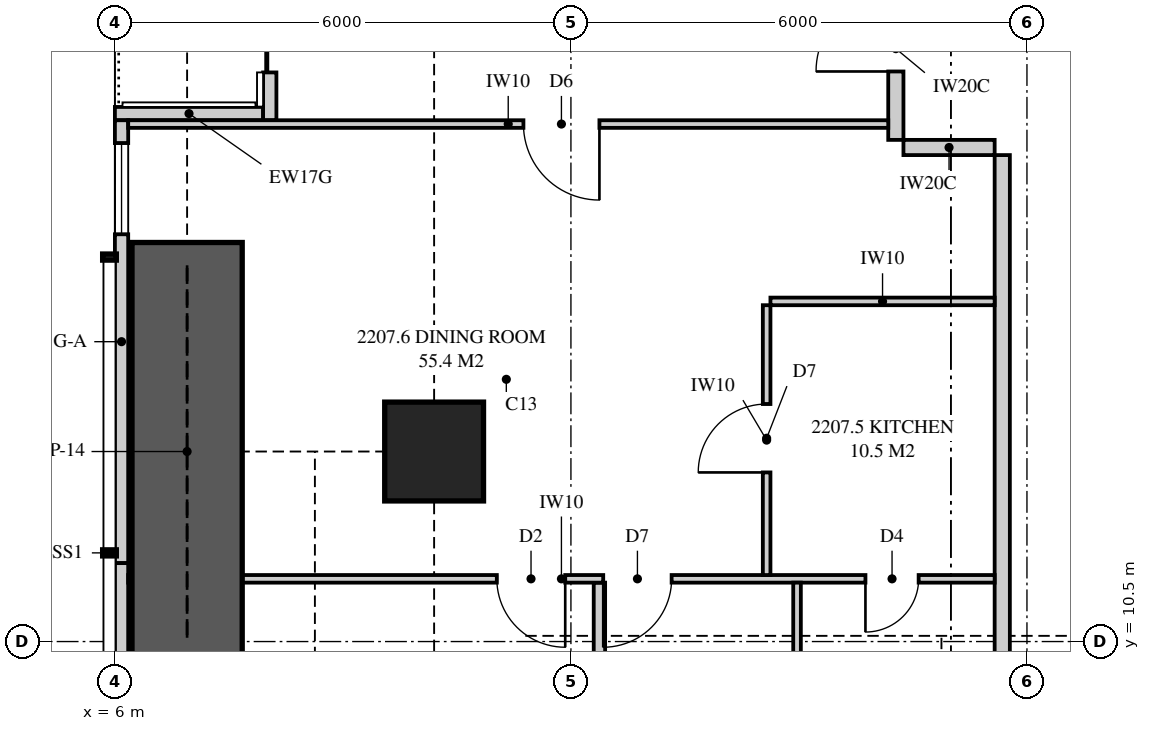
"""IFC4 building model, lengths in metres.
Left out: names, types, materials, properties, quantities, classifications, styles, units other than length and angle.
Written with IfcOpenShell. Run it as: python <this file> out.ifc"""

import sys

from ifc_helpers import new_model, si_unit, direction, frame, frame_2d, origin, origin_2d, place, context, subcontext, project, spatial, polyline, rectangle, outline, extrude, element, fill, save


model = new_model("IFC4")
c1 = context("Model", 3, precision=1e-05, world=origin(), true_north=direction((0.0, 1.0)))
c2 = subcontext(c1, "Body", "Model", "MODEL_VIEW")
j1 = project(units=[si_unit("LENGTHUNIT", "METRE"), si_unit("PLANEANGLEUNIT", "RADIAN")], contexts=[c1])
p1 = place(None, origin())
s1 = spatial("IfcSite", under=j1, at=p1, CompositionType="ELEMENT")
p2 = place(p1, origin())
s2 = spatial("IfcBuilding", under=s1, at=p2, CompositionType="ELEMENT")
p3 = place(p2, frame((0.0, 0.0, 84.75)))
s3 = spatial("IfcBuildingStorey", under=s2, at=p3, CompositionType="ELEMENT", Elevation=84.75)
p4 = place(p3, frame((10.2, 13.0, 0.0), z_axis=(0.0, 0.0, 1.0), x_axis=(1.0, 0.0, 0.0)))
e1 = element("IfcColumn", 1, at=p4, inside=s3, PredefinedType="COLUMN", context=c2, shape_type="SweptSolid", body=[
    extrude(rectangle(XDim=1.3, YDim=1.3, at=origin_2d()), origin(), (0.0, 0.0, 1.0), 3.35),
])
p5 = place(p3, frame((6.087, 17.358, 0.0), z_axis=(0.0, 0.0, 1.0), x_axis=(0.0, -1.0, 0.0)))
e2 = element("IfcWall", 2, at=p5, inside=s3, PredefinedType="SOLIDWALL", context=c2, shape_type="SweptSolid", body=[
    extrude(outline(polyline([(5.118, 0.092), (5.118, 0.0), (5.826, 0.0), (5.826, 2.15), (0.0, 2.15), (0.0, 0.0), (3.598, 0.0), (3.598, 0.092), (5.118, 0.092)])), frame((0.0, 0.087, 0.0), z_axis=(0.0, -1.0, 0.0), x_axis=(1.0, 0.0, 0.0)), (0.0, 0.0, 1.0), 0.175),
])
p6 = place(p5, frame((0.3, 0.0, 0.4)))
e3 = element("IfcOpeningElement", 3, at=p6, cuts=e2, PredefinedType="OPENING", context=c2, shape_type="SweptSolid", body=[
    extrude(rectangle(XDim=1.2, YDim=1.7, at=frame_2d((0.6, 0.85))), frame((0.0, 0.097, 0.0), z_axis=(0.0, -1.0, 0.0), x_axis=(1.0, 0.0, 0.0)), (0.0, 0.0, 1.0), 0.195),
])
p7 = place(p3, frame((6.087, 11.532, 0.0), z_axis=(0.0, 0.0, 1.0), x_axis=(0.0, -1.0, 0.0)))
e4 = element("IfcWall", 4, at=p7, inside=s3, PredefinedType="SOLIDWALL", context=c2, shape_type="SweptSolid", body=[
    extrude(rectangle(XDim=8.481, YDim=0.175, at=frame_2d((4.24, 0.0))), origin(), (0.0, 0.0, 1.0), 3.11),
])
p8 = place(p7, frame((1.407, 0.0, 0.4)))
e5 = element("IfcOpeningElement", 5, at=p8, cuts=e4, PredefinedType="OPENING", context=c2, shape_type="SweptSolid", body=[
    extrude(rectangle(XDim=1.8, YDim=1.7, at=frame_2d((0.9, 0.85))), frame((0.0, 0.097, 0.0), z_axis=(0.0, -1.0, 0.0), x_axis=(1.0, 0.0, 0.0)), (0.0, 0.0, 1.0), 0.195),
])
p9 = place(p7, frame((4.439, 0.0, 0.4)))
e6 = element("IfcOpeningElement", 6, at=p9, cuts=e4, PredefinedType="OPENING", context=c2, shape_type="SweptSolid", body=[
    extrude(rectangle(XDim=1.8, YDim=1.7, at=frame_2d((0.9, 0.85))), frame((0.0, 0.097, 0.0), z_axis=(0.0, -1.0, 0.0), x_axis=(1.0, 0.0, 0.0)), (0.0, 0.0, 1.0), 0.195),
])
p10 = place(p3, frame((8.038, 20.417, 0.0), z_axis=(0.0, 0.0, 1.0), x_axis=(0.0, -1.0, 0.0)))
e7 = element("IfcWall", 7, at=p10, inside=s3, PredefinedType="SOLIDWALL", context=c2, shape_type="SweptSolid", body=[
    extrude(rectangle(XDim=3.058, YDim=0.175, at=frame_2d((1.529, 0.0))), origin(), (0.0, 0.0, 1.0), 2.15),
])
p11 = place(p10, frame((0.629, 0.0, 0.0)))
e8 = element("IfcOpeningElement", 8, at=p11, cuts=e7, PredefinedType="OPENING", context=c2, shape_type="SweptSolid", body=[
    extrude(rectangle(XDim=1.8, YDim=2.1, at=frame_2d((0.9, 1.05))), frame((0.0, 0.097, 0.0), z_axis=(0.0, -1.0, 0.0), x_axis=(1.0, 0.0, 0.0)), (0.0, 0.0, 1.0), 0.195),
])
p12 = place(p3, frame((6.0, 17.446, 0.0), z_axis=(0.0, 0.0, 1.0), x_axis=(1.0, 0.0, 0.0)))
e9 = element("IfcWall", 9, at=p12, inside=s3, PredefinedType="SOLIDWALL", context=c2, shape_type="SweptSolid", body=[
    extrude(rectangle(XDim=1.95, YDim=0.175, at=frame_2d((0.975, 0.0))), origin(), (0.0, 0.0, 1.0), 2.15),
])
p13 = place(p3, frame((17.675, 7.825, 0.0), z_axis=(0.0, 0.0, 1.0), x_axis=(0.0, 1.0, 0.0)))
e10 = element("IfcWall", 10, at=p13, inside=s3, PredefinedType="PARTITIONING", context=c2, shape_type="SweptSolid", body=[
    extrude(outline(polyline([(0.0, 0.0), (9.075, 0.0), (9.075, 3.11), (3.096, 3.11), (3.096, 2.531), (2.404, 2.531), (2.404, 3.11), (0.0, 3.11), (0.0, 0.0)])), frame((0.0, 0.1, 0.0), z_axis=(0.0, -1.0, 0.0), x_axis=(1.0, 0.0, 0.0)), (0.0, 0.0, 1.0), 0.2),
])
p14 = place(p3, frame((6.175, 11.325, 0.0), z_axis=(0.0, 0.0, 1.0), x_axis=(1.0, 0.0, 0.0)))
e11 = element("IfcWall", 11, at=p14, inside=s3, PredefinedType="PARTITIONING", context=c2, shape_type="SweptSolid", body=[
    extrude(outline(polyline([(0.0, 0.0), (11.4, 0.0), (11.4, 3.11), (5.285, 3.11), (5.285, 2.51), (2.765, 2.51), (2.765, 3.11), (2.753, 3.11), (2.753, 2.531), (2.16, 2.531), (2.16, 3.11), (2.121, 3.11), (2.121, 2.15), (1.021, 2.15), (1.021, 1.734), (0.529, 1.734), (0.529, 2.15), (0.0, 2.15), (0.0, 0.0)])), frame((0.0, 0.05, 0.0), z_axis=(0.0, -1.0, 0.0), x_axis=(1.0, 0.0, 0.0)), (0.0, 0.0, 1.0), 0.1),
])
p15 = place(p14, frame((4.85, 0.0, 0.0)))
e12 = element("IfcOpeningElement", 12, at=p15, cuts=e11, PredefinedType="OPENING", context=c2, shape_type="SweptSolid", body=[
    extrude(rectangle(XDim=0.9, YDim=2.1, at=frame_2d((0.45, 1.05))), frame((0.0, 0.06, 0.0), z_axis=(0.0, -1.0, 0.0), x_axis=(1.0, 0.0, 0.0)), (0.0, 0.0, 1.0), 0.12),
])
p16 = place(p14, frame((6.25, 0.0, 0.0)))
e13 = element("IfcOpeningElement", 13, at=p16, cuts=e11, PredefinedType="OPENING", context=c2, shape_type="SweptSolid", body=[
    extrude(rectangle(XDim=0.9, YDim=2.1, at=frame_2d((0.45, 1.05))), frame((0.0, 0.06, 0.0), z_axis=(0.0, -1.0, 0.0), x_axis=(1.0, 0.0, 0.0)), (0.0, 0.0, 1.0), 0.12),
])
p17 = place(p14, frame((9.7, 0.0, 0.0)))
e14 = element("IfcOpeningElement", 14, at=p17, cuts=e11, PredefinedType="OPENING", context=c2, shape_type="SweptSolid", body=[
    extrude(rectangle(XDim=0.7, YDim=2.1, at=frame_2d((0.35, 1.05))), frame((0.0, 0.06, 0.0), z_axis=(0.0, -1.0, 0.0), x_axis=(1.0, 0.0, 0.0)), (0.0, 0.0, 1.0), 0.12),
])
p18 = place(p3, frame((12.375, 7.825, 0.0), z_axis=(0.0, 0.0, 1.0), x_axis=(0.0, 1.0, 0.0)))
e15 = element("IfcWall", 15, at=p18, inside=s3, PredefinedType="PLUMBINGWALL", context=c2, shape_type="SweptSolid", body=[
    extrude(outline(polyline([(0.0, 0.0), (3.45, 0.0), (3.45, 3.11), (3.071, 3.11), (3.071, 2.531), (2.429, 2.531), (2.429, 3.11), (0.0, 3.11), (0.0, 0.0)])), frame((0.0, 0.075, 0.0), z_axis=(0.0, -1.0, 0.0), x_axis=(1.0, 0.0, 0.0)), (0.0, 0.0, 1.0), 0.15),
])
p19 = place(p3, frame((14.975, 7.825, 0.0), z_axis=(0.0, 0.0, 1.0), x_axis=(0.0, 1.0, 0.0)))
e16 = element("IfcWall", 16, at=p19, inside=s3, PredefinedType="PARTITIONING", context=c2, shape_type="SweptSolid", body=[
    extrude(outline(polyline([(0.0, 0.0), (3.45, 0.0), (3.45, 3.11), (3.046, 3.11), (3.046, 2.531), (2.454, 2.531), (2.454, 3.11), (0.0, 3.11), (0.0, 0.0)])), frame((0.0, 0.05, 0.0), z_axis=(0.0, -1.0, 0.0), x_axis=(1.0, 0.0, 0.0)), (0.0, 0.0, 1.0), 0.1),
])
p20 = place(p3, frame((14.575, 11.375, 0.0), z_axis=(0.0, 0.0, 1.0), x_axis=(0.0, 1.0, 0.0)))
e17 = element("IfcWall", 17, at=p20, inside=s3, PredefinedType="PARTITIONING", context=c2, shape_type="SweptSolid", body=[
    extrude(rectangle(XDim=3.55, YDim=0.1, at=frame_2d((1.775, 0.0))), origin(), (0.0, 0.0, 1.0), 3.11),
])
p21 = place(p20, frame((1.35, 0.0, 0.0)))
e18 = element("IfcOpeningElement", 18, at=p21, cuts=e17, PredefinedType="OPENING", context=c2, shape_type="SweptSolid", body=[
    extrude(rectangle(XDim=0.9, YDim=2.1, at=frame_2d((0.45, 1.05))), frame((0.0, 0.06, 0.0), z_axis=(0.0, -1.0, 0.0), x_axis=(1.0, 0.0, 0.0)), (0.0, 0.0, 1.0), 0.12),
])
p22 = place(p3, frame((14.625, 14.975, 0.0), z_axis=(0.0, 0.0, 1.0), x_axis=(1.0, 0.0, 0.0)))
e19 = element("IfcWall", 19, at=p22, inside=s3, PredefinedType="PARTITIONING", context=c2, shape_type="SweptSolid", body=[
    extrude(rectangle(XDim=2.95, YDim=0.1, at=frame_2d((1.475, 0.0))), origin(), (0.0, 0.0, 1.0), 3.11),
])
p23 = place(p3, frame((6.175, 17.308, 0.0), z_axis=(0.0, 0.0, 1.0), x_axis=(1.0, 0.0, 0.0)))
e20 = element("IfcWall", 20, at=p23, inside=s3, PredefinedType="PARTITIONING", context=c2, shape_type="SweptSolid", body=[
    extrude(outline(polyline([(0.0, 0.0), (10.0, 0.0), (10.0, 3.11), (5.285, 3.11), (5.285, 2.51), (2.765, 2.51), (2.765, 3.11), (1.835, 3.11), (1.835, 2.15), (0.0, 2.15), (0.0, 3.11), (0.0, 0.0)])), frame((0.0, 0.05, 0.0), z_axis=(0.0, -1.0, 0.0), x_axis=(1.0, 0.0, 0.0)), (0.0, 0.0, 1.0), 0.1),
])
p24 = place(p23, frame((5.2, 0.0, 0.0)))
e21 = element("IfcOpeningElement", 21, at=p24, cuts=e20, PredefinedType="OPENING", context=c2, shape_type="SweptSolid", body=[
    extrude(rectangle(XDim=1.0, YDim=2.1, at=frame_2d((0.5, 1.05))), frame((0.0, 0.06, 0.0), z_axis=(0.0, -1.0, 0.0), x_axis=(1.0, 0.0, 0.0)), (0.0, 0.0, 1.0), 0.12),
])
p25 = place(p3, frame((16.275, 17.1, 0.0), z_axis=(0.0, 0.0, 1.0), x_axis=(0.0, 1.0, 0.0)))
e22 = element("IfcWall", 22, at=p25, inside=s3, PredefinedType="PARTITIONING", context=c2, shape_type="SweptSolid", body=[
    extrude(rectangle(XDim=2.4, YDim=0.2, at=frame_2d((1.2, 0.0))), origin(), (0.0, 0.0, 1.0), 3.11),
])
p26 = place(p25, frame((0.9, 0.0, 0.0)))
e23 = element("IfcOpeningElement", 23, at=p26, cuts=e22, PredefinedType="OPENING", context=c2, shape_type="SweptSolid", body=[
    extrude(rectangle(XDim=1.05, YDim=2.2, at=frame_2d((0.525, 1.1))), frame((0.0, 0.11, 0.0), z_axis=(0.0, -1.0, 0.0), x_axis=(1.0, 0.0, 0.0)), (0.0, 0.0, 1.0), 0.22),
])
p27 = place(p3, frame((17.575, 17.0, 0.0), z_axis=(0.0, 0.0, 1.0), x_axis=(-1.0, 0.0, 0.0)))
e24 = element("IfcWall", 24, at=p27, inside=s3, PredefinedType="PARTITIONING", context=c2, shape_type="SweptSolid", body=[
    extrude(rectangle(XDim=1.2, YDim=0.2, at=frame_2d((0.6, 0.0))), origin(), (0.0, 0.0, 1.0), 3.11),
])
p28 = place(p3, frame((6.95, 10.25, 0.0), z_axis=(0.0, 0.0, 1.0), x_axis=(0.0, 1.0, 0.0)))
e25 = element("IfcWall", 25, at=p28, inside=s3, PredefinedType="SHEAR", context=c2, shape_type="SweptSolid", body=[
    extrude(rectangle(XDim=5.5, YDim=1.45, at=frame_2d((2.75, 0.0))), origin(), (0.0, 0.0, 1.0), 3.35),
])
p29 = place(p11, origin())
e26 = element("IfcDoor", 26, at=p29, inside=s3, OperationType="SLIDING_TO_LEFT", PredefinedType="DOOR", context=c2, shape_type="SweptSolid", body=[
    extrude(rectangle(XDim=1.8, YDim=2.1, at=frame_2d((0.9, 1.05))), frame((0.0, 0.025, 0.0), z_axis=(0.0, -1.0, 0.0), x_axis=(1.0, 0.0, 0.0)), (0.0, 0.0, 1.0), 0.05),
])
fill(e8, e26)
p30 = place(p6, origin())
e27 = element("IfcWindow", 27, at=p30, inside=s3, PartitioningType="SINGLE_PANEL", PredefinedType="WINDOW", context=c2, shape_type="SweptSolid", body=[
    extrude(rectangle(XDim=1.2, YDim=1.7, at=frame_2d((0.6, 0.85))), frame((0.0, 0.03, 0.0), z_axis=(0.0, -1.0, 0.0), x_axis=(1.0, 0.0, 0.0)), (0.0, 0.0, 1.0), 0.06),
])
fill(e3, e27)
p31 = place(p26, origin())
e28 = element("IfcDoor", 28, at=p31, inside=s3, OperationType="SINGLE_SWING_LEFT", PredefinedType="DOOR", context=c2, shape_type="SweptSolid", body=[
    extrude(rectangle(XDim=1.05, YDim=2.2, at=frame_2d((0.525, 1.1))), frame((0.0, 0.025, 0.0), z_axis=(0.0, -1.0, 0.0), x_axis=(1.0, 0.0, 0.0)), (0.0, 0.0, 1.0), 0.05),
])
fill(e23, e28)
p32 = place(p15, frame((0.9, 0.0, 0.0), z_axis=(0.0, 0.0, 1.0), x_axis=(-1.0, 0.0, 0.0)))
e29 = element("IfcDoor", 29, at=p32, inside=s3, OperationType="SINGLE_SWING_LEFT", PredefinedType="DOOR", context=c2, shape_type="SweptSolid", body=[
    extrude(rectangle(XDim=0.9, YDim=2.1, at=frame_2d((0.45, 1.05))), frame((0.0, 0.025, 0.0), z_axis=(0.0, -1.0, 0.0), x_axis=(1.0, 0.0, 0.0)), (0.0, 0.0, 1.0), 0.05),
])
fill(e12, e29)
p33 = place(p16, frame((0.9, 0.0, 0.0), z_axis=(0.0, 0.0, 1.0), x_axis=(-1.0, 0.0, 0.0)))
e30 = element("IfcDoor", 30, at=p33, inside=s3, OperationType="SINGLE_SWING_RIGHT", PredefinedType="DOOR", context=c2, shape_type="SweptSolid", body=[
    extrude(rectangle(XDim=0.9, YDim=2.1, at=frame_2d((0.45, 1.05))), frame((0.0, 0.025, 0.0), z_axis=(0.0, -1.0, 0.0), x_axis=(1.0, 0.0, 0.0)), (0.0, 0.0, 1.0), 0.05),
])
fill(e13, e30)
p34 = place(p17, frame((0.7, 0.0, 0.0), z_axis=(0.0, 0.0, 1.0), x_axis=(-1.0, 0.0, 0.0)))
e31 = element("IfcDoor", 31, at=p34, inside=s3, OperationType="SINGLE_SWING_RIGHT", PredefinedType="DOOR", context=c2, shape_type="SweptSolid", body=[
    extrude(rectangle(XDim=0.7, YDim=2.1, at=frame_2d((0.35, 1.05))), frame((0.0, 0.025, 0.0), z_axis=(0.0, -1.0, 0.0), x_axis=(1.0, 0.0, 0.0)), (0.0, 0.0, 1.0), 0.05),
])
fill(e14, e31)
p35 = place(p21, origin())
e32 = element("IfcDoor", 32, at=p35, inside=s3, OperationType="SINGLE_SWING_LEFT", PredefinedType="DOOR", context=c2, shape_type="SweptSolid", body=[
    extrude(rectangle(XDim=0.9, YDim=2.1, at=frame_2d((0.45, 1.05))), frame((0.0, 0.025, 0.0), z_axis=(0.0, -1.0, 0.0), x_axis=(1.0, 0.0, 0.0)), (0.0, 0.0, 1.0), 0.05),
])
fill(e18, e32)
p36 = place(p24, frame((1.0, 0.0, 0.0), z_axis=(0.0, 0.0, 1.0), x_axis=(-1.0, 0.0, 0.0)))
e33 = element("IfcDoor", 33, at=p36, inside=s3, OperationType="SINGLE_SWING_LEFT", PredefinedType="DOOR", context=c2, shape_type="SweptSolid", body=[
    extrude(rectangle(XDim=1.0, YDim=2.1, at=frame_2d((0.5, 1.05))), frame((0.0, 0.025, 0.0), z_axis=(0.0, -1.0, 0.0), x_axis=(1.0, 0.0, 0.0)), (0.0, 0.0, 1.0), 0.05),
])
fill(e21, e33)
save(model, sys.argv[1])
